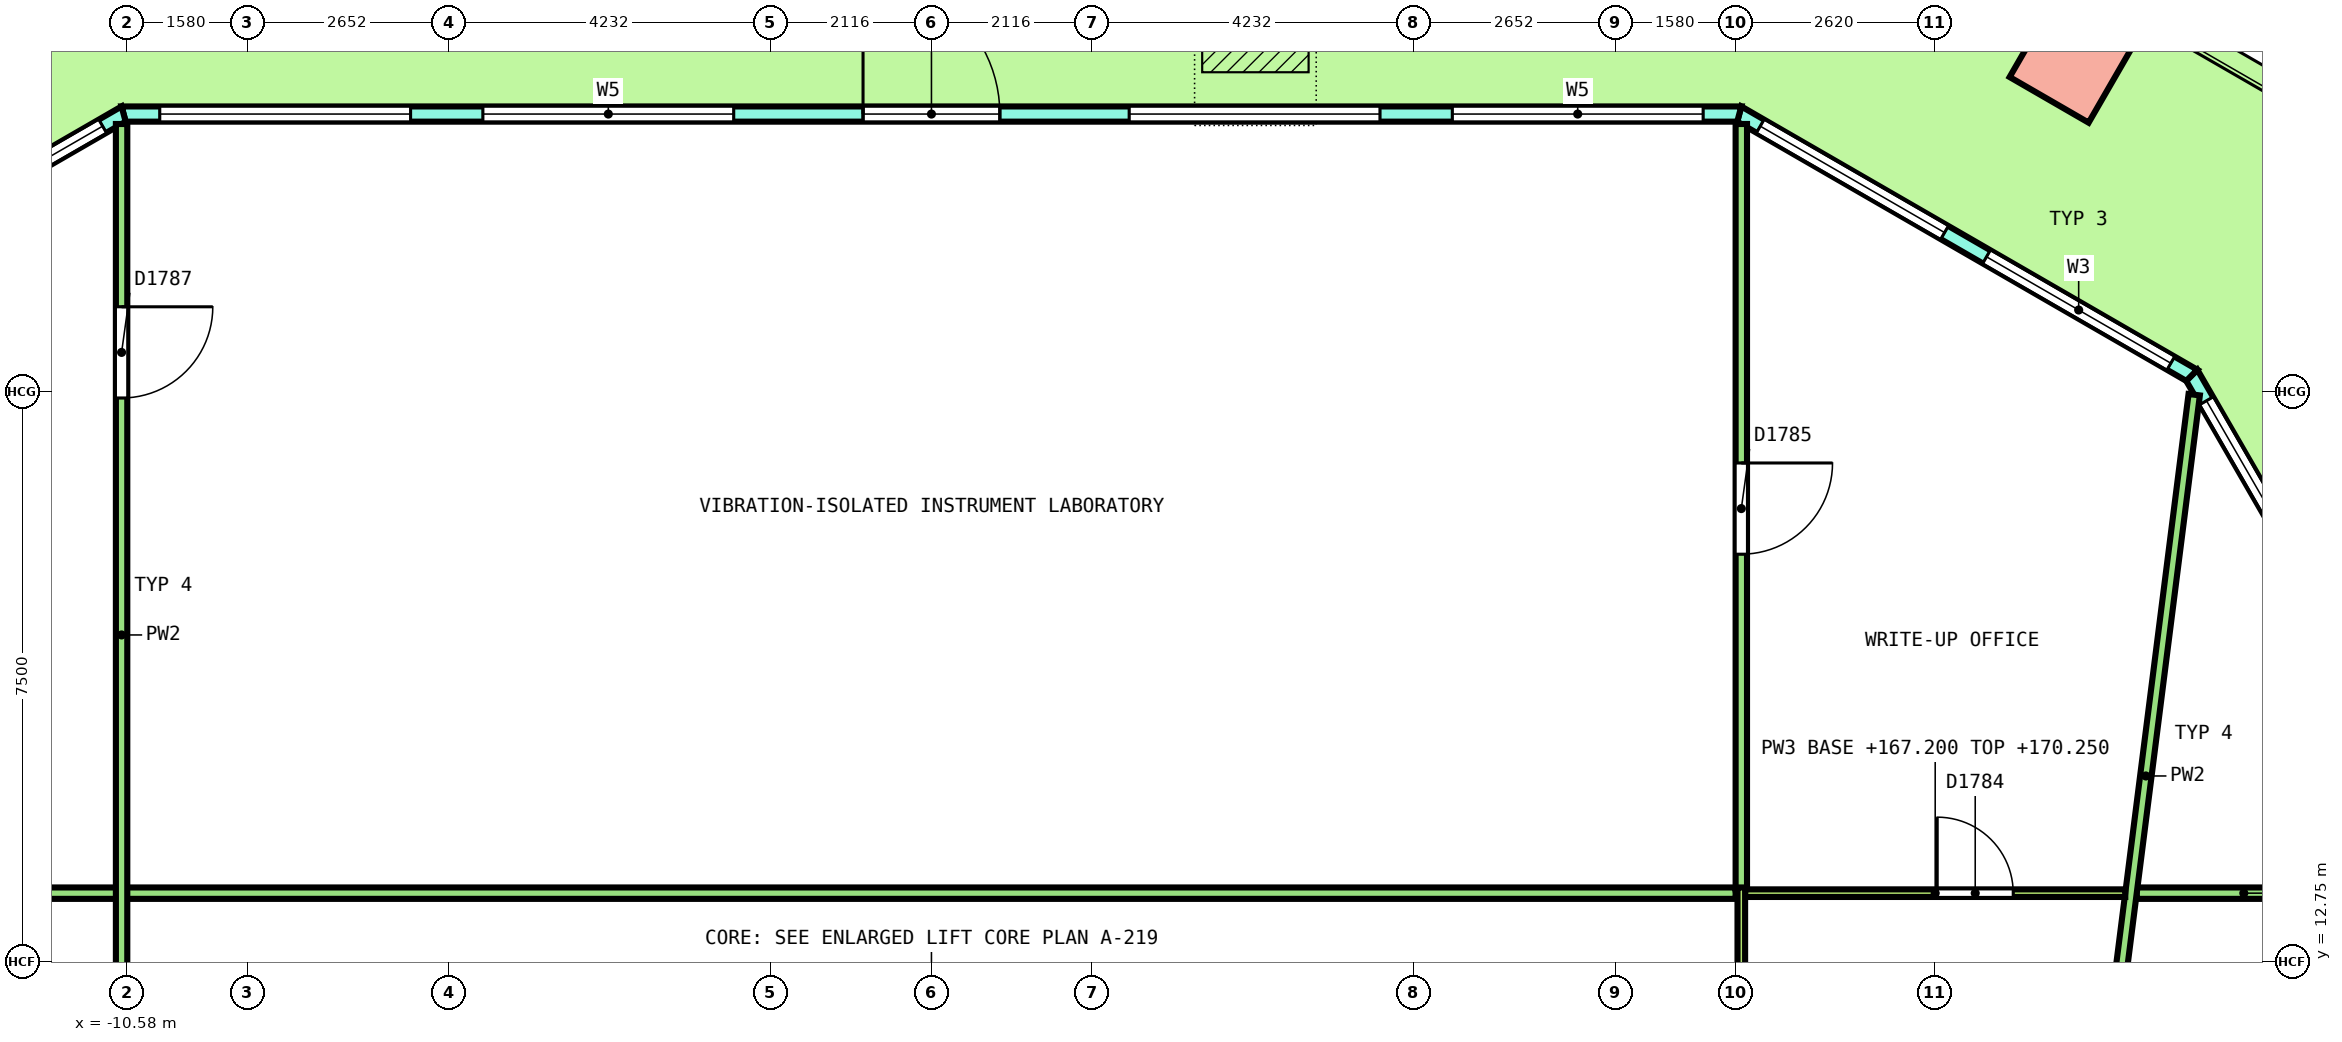
"""IFC4 building model, lengths in metres.
Left out: names, types, materials, properties, quantities, classifications, styles, units other than length and angle.
Written with IfcOpenShell. Run it as: python <this file> out.ifc"""

import sys

from ifc_helpers import new_model, si_unit, direction, frame, frame_2d, origin, origin_2d, place, context, subcontext, project, spatial, polyline, rectangle, outline, extrude, element, fill, save


model = new_model("IFC4")
c1 = context("Model", 3, precision=1e-05, world=origin(), true_north=direction((0.0, 1.0)))
c2 = subcontext(c1, "Body", "Model", "MODEL_VIEW")
j1 = project(units=[si_unit("LENGTHUNIT", "METRE"), si_unit("PLANEANGLEUNIT", "RADIAN")], contexts=[c1])
p1 = place(None, origin())
s1 = spatial("IfcSite", under=j1, at=p1, CompositionType="ELEMENT")
p2 = place(p1, origin())
s2 = spatial("IfcBuilding", under=s1, at=p2, CompositionType="ELEMENT")
p3 = place(p2, frame((0.0, 0.0, 167.2)))
s3 = spatial("IfcBuildingStorey", under=s2, at=p3, CompositionType="ELEMENT", Elevation=167.2)
p4 = place(p3, frame((15.005, 24.606, 0.0), z_axis=(0.036265236264, 0.0, 0.999342199969), x_axis=(-0.865313546461, 0.500246354177, 0.031401456084)))
e1 = element("IfcColumn", 1, at=p4, inside=s3, PredefinedType="COLUMN", context=c2, shape_type="SweptSolid", body=[
    extrude(rectangle(XDim=1.2, YDim=1.2, at=origin_2d()), origin(), (0.0, 0.0, 1.0), 4.053),
])
p5 = place(p3, frame((26.012, 4.129, 0.0), z_axis=(0.0, 0.0, 1.0), x_axis=(-0.499999588275, 0.866025641494, 0.0)))
e2 = element("IfcWall", 2, at=p5, inside=s3, PredefinedType="SOLIDWALL", context=c2, shape_type="SweptSolid", body=[
    extrude(outline(polyline([(-0.027, -0.1), (1.024, -0.1), (2.075, -0.1), (3.125, -0.1), (4.176, -0.1), (5.227, -0.1), (6.278, -0.1), (7.329, -0.1), (8.38, -0.1), (9.43, -0.1), (10.481, -0.1), (11.532, -0.1), (12.583, -0.1), (13.634, -0.1), (14.685, -0.1), (15.735, -0.1), (16.786, -0.1), (17.837, -0.1), (18.888, -0.1), (18.834, 0.1), (17.789, 0.1), (16.744, 0.1), (15.699, 0.1), (14.655, 0.1), (13.61, 0.1), (12.565, 0.1), (11.52, 0.1), (10.475, 0.1), (9.43, 0.1), (8.385, 0.1), (7.341, 0.1), (6.296, 0.1), (5.251, 0.1), (4.206, 0.1), (3.161, 0.1), (2.116, 0.1), (1.072, 0.1), (0.027, 0.1), (-0.027, -0.1)])), origin(), (0.0, 0.0, 1.0), 4.1),
])
p6 = place(p5, frame((0.386, 0.0, 0.1)))
e3 = element("IfcOpeningElement", 3, at=p6, cuts=e2, PredefinedType="OPENING", context=c2, shape_type="SweptSolid", body=[
    extrude(rectangle(XDim=3.0, YDim=2.9, at=frame_2d((1.5, 1.45))), frame((0.0, 0.11, 0.0), z_axis=(0.0, -1.0, 0.0), x_axis=(1.0, 0.0, 0.0)), (0.0, 0.0, 1.0), 0.22),
])
p7 = place(p5, frame((4.158, 0.0, 0.1)))
e4 = element("IfcOpeningElement", 4, at=p7, cuts=e2, PredefinedType="OPENING", context=c2, shape_type="SweptSolid", body=[
    extrude(rectangle(XDim=3.0, YDim=2.9, at=frame_2d((1.5, 1.45))), frame((0.0, 0.11, 0.0), z_axis=(0.0, -1.0, 0.0), x_axis=(1.0, 0.0, 0.0)), (0.0, 0.0, 1.0), 0.22),
])
p8 = place(p5, frame((8.531, 0.0, 0.0)))
e5 = element("IfcOpeningElement", 5, at=p8, cuts=e2, PredefinedType="OPENING", context=c2, shape_type="SweptSolid", body=[
    extrude(rectangle(XDim=1.8, YDim=2.4, at=frame_2d((0.9, 1.2))), frame((0.0, 0.11, 0.0), z_axis=(0.0, -1.0, 0.0), x_axis=(1.0, 0.0, 0.0)), (0.0, 0.0, 1.0), 0.22),
])
p9 = place(p5, frame((8.531, 0.0, 2.55)))
e6 = element("IfcOpeningElement", 6, at=p9, cuts=e2, PredefinedType="OPENING", context=c2, shape_type="SweptSolid", body=[
    extrude(rectangle(XDim=1.8, YDim=0.45, at=frame_2d((0.9, 0.225))), frame((0.0, 0.11, 0.0), z_axis=(0.0, -1.0, 0.0), x_axis=(1.0, 0.0, 0.0)), (0.0, 0.0, 1.0), 0.22),
])
p10 = place(p5, frame((11.703, 0.0, 0.1)))
e7 = element("IfcOpeningElement", 7, at=p10, cuts=e2, PredefinedType="OPENING", context=c2, shape_type="SweptSolid", body=[
    extrude(rectangle(XDim=3.0, YDim=2.9, at=frame_2d((1.5, 1.45))), frame((0.0, 0.11, 0.0), z_axis=(0.0, -1.0, 0.0), x_axis=(1.0, 0.0, 0.0)), (0.0, 0.0, 1.0), 0.22),
])
p11 = place(p5, frame((15.475, 0.0, 0.1)))
e8 = element("IfcOpeningElement", 8, at=p11, cuts=e2, PredefinedType="OPENING", context=c2, shape_type="SweptSolid", body=[
    extrude(rectangle(XDim=3.0, YDim=2.9, at=frame_2d((1.5, 1.45))), frame((0.0, 0.11, 0.0), z_axis=(0.0, -1.0, 0.0), x_axis=(1.0, 0.0, 0.0)), (0.0, 0.0, 1.0), 0.22),
])
p12 = place(p3, frame((16.582, 20.463, 0.0), z_axis=(0.0, 0.0, 1.0), x_axis=(-0.866029458321, 0.49999297727, 0.0)))
e9 = element("IfcWall", 9, at=p12, inside=s3, PredefinedType="SOLIDWALL", context=c2, shape_type="SweptSolid", body=[
    extrude(outline(polyline([(-0.027, -0.1), (1.128, -0.1), (2.282, -0.1), (3.437, -0.1), (4.592, -0.1), (5.747, -0.1), (6.901, -0.1), (6.848, 0.1), (5.711, 0.1), (4.574, 0.1), (3.437, 0.1), (2.301, 0.1), (1.164, 0.1), (0.027, 0.1), (-0.027, -0.1)])), origin(), (0.0, 0.0, 1.0), 4.1),
])
p13 = place(p12, frame((0.319, 0.0, 0.1)))
e10 = element("IfcOpeningElement", 10, at=p13, cuts=e9, PredefinedType="OPENING", context=c2, shape_type="SweptSolid", body=[
    extrude(rectangle(XDim=2.8, YDim=2.9, at=frame_2d((1.4, 1.45))), frame((0.0, 0.11, 0.0), z_axis=(0.0, -1.0, 0.0), x_axis=(1.0, 0.0, 0.0)), (0.0, 0.0, 1.0), 0.22),
])
p14 = place(p12, frame((3.756, 0.0, 0.1)))
e11 = element("IfcOpeningElement", 11, at=p14, cuts=e9, PredefinedType="OPENING", context=c2, shape_type="SweptSolid", body=[
    extrude(rectangle(XDim=2.8, YDim=2.9, at=frame_2d((1.4, 1.45))), frame((0.0, 0.11, 0.0), z_axis=(0.0, -1.0, 0.0), x_axis=(1.0, 0.0, 0.0)), (0.0, 0.0, 1.0), 0.22),
])
p15 = place(p3, frame((10.628, 23.9, 0.0), z_axis=(0.0, 0.0, 1.0), x_axis=(-1.0, 0.0, 0.0)))
e12 = element("IfcWall", 12, at=p15, inside=s3, PredefinedType="SOLIDWALL", context=c2, shape_type="SweptSolid", body=[
    extrude(outline(polyline([(-0.027, -0.1), (0.988, -0.1), (2.003, -0.1), (3.017, -0.1), (4.032, -0.1), (5.047, -0.1), (6.062, -0.1), (7.076, -0.1), (8.091, -0.1), (9.106, -0.1), (10.121, -0.1), (11.135, -0.1), (12.15, -0.1), (13.165, -0.1), (14.179, -0.1), (15.194, -0.1), (16.209, -0.1), (17.224, -0.1), (18.239, -0.1), (19.253, -0.1), (20.268, -0.1), (21.283, -0.1), (21.229, 0.1), (20.219, 0.1), (19.21, 0.1), (18.2, 0.1), (17.19, 0.1), (16.181, 0.1), (15.171, 0.1), (14.162, 0.1), (13.152, 0.1), (12.142, 0.1), (11.133, 0.1), (10.123, 0.1), (9.114, 0.1), (8.104, 0.1), (7.094, 0.1), (6.085, 0.1), (5.075, 0.1), (4.065, 0.1), (3.056, 0.1), (2.046, 0.1), (1.036, 0.1), (0.027, 0.1), (-0.027, -0.1)])), origin(), (0.0, 0.0, 1.0), 4.1),
])
p16 = place(p15, frame((0.476, 0.0, 0.1)))
e13 = element("IfcOpeningElement", 13, at=p16, cuts=e12, PredefinedType="OPENING", context=c2, shape_type="SweptSolid", body=[
    extrude(rectangle(XDim=3.3, YDim=2.9, at=frame_2d((1.65, 1.45))), frame((0.0, 0.11, 0.0), z_axis=(0.0, -1.0, 0.0), x_axis=(1.0, 0.0, 0.0)), (0.0, 0.0, 1.0), 0.22),
])
p17 = place(p15, frame((4.727, 0.0, 0.1)))
e14 = element("IfcOpeningElement", 14, at=p17, cuts=e12, PredefinedType="OPENING", context=c2, shape_type="SweptSolid", body=[
    extrude(rectangle(XDim=3.3, YDim=2.9, at=frame_2d((1.65, 1.45))), frame((0.0, 0.11, 0.0), z_axis=(0.0, -1.0, 0.0), x_axis=(1.0, 0.0, 0.0)), (0.0, 0.0, 1.0), 0.22),
])
p18 = place(p15, frame((9.728, 0.0, 0.0)))
e15 = element("IfcOpeningElement", 15, at=p18, cuts=e12, PredefinedType="OPENING", context=c2, shape_type="SweptSolid", body=[
    extrude(rectangle(XDim=1.8, YDim=2.4, at=frame_2d((0.9, 1.2))), frame((0.0, 0.11, 0.0), z_axis=(0.0, -1.0, 0.0), x_axis=(1.0, 0.0, 0.0)), (0.0, 0.0, 1.0), 0.22),
])
p19 = place(p15, frame((9.728, 0.0, 2.55)))
e16 = element("IfcOpeningElement", 16, at=p19, cuts=e12, PredefinedType="OPENING", context=c2, shape_type="SweptSolid", body=[
    extrude(rectangle(XDim=1.8, YDim=0.45, at=frame_2d((0.9, 0.225))), frame((0.0, 0.11, 0.0), z_axis=(0.0, -1.0, 0.0), x_axis=(1.0, 0.0, 0.0)), (0.0, 0.0, 1.0), 0.22),
])
p20 = place(p15, frame((13.229, 0.0, 0.1)))
e17 = element("IfcOpeningElement", 17, at=p20, cuts=e12, PredefinedType="OPENING", context=c2, shape_type="SweptSolid", body=[
    extrude(rectangle(XDim=3.3, YDim=2.9, at=frame_2d((1.65, 1.45))), frame((0.0, 0.11, 0.0), z_axis=(0.0, -1.0, 0.0), x_axis=(1.0, 0.0, 0.0)), (0.0, 0.0, 1.0), 0.22),
])
p21 = place(p15, frame((17.48, 0.0, 0.1)))
e18 = element("IfcOpeningElement", 18, at=p21, cuts=e12, PredefinedType="OPENING", context=c2, shape_type="SweptSolid", body=[
    extrude(rectangle(XDim=3.3, YDim=2.9, at=frame_2d((1.65, 1.45))), frame((0.0, 0.11, 0.0), z_axis=(0.0, -1.0, 0.0), x_axis=(1.0, 0.0, 0.0)), (0.0, 0.0, 1.0), 0.22),
])
p22 = place(p3, frame((-10.628, 23.9, 0.0), z_axis=(0.0, 0.0, 1.0), x_axis=(-0.866029458321, -0.49999297727, 0.0)))
e19 = element("IfcWall", 19, at=p22, inside=s3, PredefinedType="SOLIDWALL", context=c2, shape_type="SweptSolid", body=[
    extrude(outline(polyline([(-0.027, -0.1), (1.128, -0.1), (2.282, -0.1), (3.437, -0.1), (4.592, -0.1), (5.747, -0.1), (6.901, -0.1), (6.848, 0.1), (5.711, 0.1), (4.574, 0.1), (3.437, 0.1), (2.301, 0.1), (1.164, 0.1), (0.027, 0.1), (-0.027, -0.1)])), origin(), (0.0, 0.0, 1.0), 4.1),
])
p23 = place(p22, frame((0.319, 0.0, 0.1)))
e20 = element("IfcOpeningElement", 20, at=p23, cuts=e19, PredefinedType="OPENING", context=c2, shape_type="SweptSolid", body=[
    extrude(rectangle(XDim=2.8, YDim=2.9, at=frame_2d((1.4, 1.45))), frame((0.0, 0.11, 0.0), z_axis=(0.0, -1.0, 0.0), x_axis=(1.0, 0.0, 0.0)), (0.0, 0.0, 1.0), 0.22),
])
p24 = place(p22, frame((3.756, 0.0, 0.1)))
e21 = element("IfcOpeningElement", 21, at=p24, cuts=e19, PredefinedType="OPENING", context=c2, shape_type="SweptSolid", body=[
    extrude(rectangle(XDim=2.8, YDim=2.9, at=frame_2d((1.4, 1.45))), frame((0.0, 0.11, 0.0), z_axis=(0.0, -1.0, 0.0), x_axis=(1.0, 0.0, 0.0)), (0.0, 0.0, 1.0), 0.22),
])
p25 = place(p3, frame((-16.825, 13.65, 0.0), z_axis=(0.0, 0.0, 1.0), x_axis=(1.0, 0.0, 0.0)))
e22 = element("IfcWall", 22, at=p25, inside=s3, PredefinedType="PARTITIONING", context=c2, shape_type="SweptSolid", body=[
    extrude(rectangle(XDim=27.405, YDim=0.15, at=frame_2d((13.702, 0.0))), origin(), (0.0, 0.0, 1.0), 3.05),
])
p26 = place(p3, frame((15.856, 13.65, 0.0), z_axis=(0.0, 0.0, 1.0), x_axis=(1.0, 0.0, 0.0)))
e23 = element("IfcWall", 23, at=p26, inside=s3, PredefinedType="PARTITIONING", context=c2, shape_type="SweptSolid", body=[
    extrude(rectangle(XDim=2.819, YDim=0.15, at=frame_2d((1.409, 0.0))), origin(), (0.0, 0.0, 1.0), 4.1),
])
p27 = place(p3, frame((15.341, 10.176, 0.0), z_axis=(0.0, 0.0, 1.0), x_axis=(0.125826213288, 0.99205229905, 0.0)))
e24 = element("IfcWall", 24, at=p27, inside=s3, PredefinedType="PARTITIONING", context=c2, shape_type="SweptSolid", body=[
    extrude(rectangle(XDim=10.113, YDim=0.15, at=frame_2d((5.056, 0.0))), origin(), (0.0, 0.0, 1.0), 3.05),
])
p28 = place(p3, frame((10.655, 13.7, 0.0), z_axis=(0.0, 0.0, 1.0), x_axis=(0.0, 1.0, 0.0)))
e25 = element("IfcWall", 25, at=p28, inside=s3, PredefinedType="PARTITIONING", context=c2, shape_type="SweptSolid", body=[
    extrude(rectangle(XDim=10.069, YDim=0.15, at=frame_2d((5.035, 0.0))), origin(), (0.0, 0.0, 1.0), 3.05),
])
p29 = place(p28, frame((4.409, 0.0, 0.0)))
e26 = element("IfcOpeningElement", 26, at=p29, cuts=e25, PredefinedType="OPENING", context=c2, shape_type="SweptSolid", body=[
    extrude(rectangle(XDim=1.2, YDim=2.1, at=frame_2d((0.6, 1.05))), frame((0.0, 0.085, 0.0), z_axis=(0.0, -1.0, 0.0), x_axis=(1.0, 0.0, 0.0)), (0.0, 0.0, 1.0), 0.17),
])
p30 = place(p3, frame((-10.655, 10.325, 0.0), z_axis=(0.0, 0.0, 1.0), x_axis=(0.0, 1.0, 0.0)))
e27 = element("IfcWall", 27, at=p30, inside=s3, PredefinedType="PARTITIONING", context=c2, shape_type="SweptSolid", body=[
    extrude(rectangle(XDim=13.444, YDim=0.15, at=frame_2d((6.722, 0.0))), origin(), (0.0, 0.0, 1.0), 3.05),
])
p31 = place(p30, frame((9.839, 0.0, 0.0)))
e28 = element("IfcOpeningElement", 28, at=p31, cuts=e27, PredefinedType="OPENING", context=c2, shape_type="SweptSolid", body=[
    extrude(rectangle(XDim=1.2, YDim=2.1, at=frame_2d((0.6, 1.05))), frame((0.0, 0.085, 0.0), z_axis=(0.0, -1.0, 0.0), x_axis=(1.0, 0.0, 0.0)), (0.0, 0.0, 1.0), 0.17),
])
p32 = place(p3, frame((10.705, 13.65, 0.0), z_axis=(0.0, 0.0, 1.0), x_axis=(1.0, 0.0, 0.0)))
e29 = element("IfcWall", 29, at=p32, inside=s3, PredefinedType="PARTITIONING", context=c2, shape_type="SweptSolid", body=[
    extrude(rectangle(XDim=5.002, YDim=0.1, at=frame_2d((2.501, 0.0))), origin(), (0.0, 0.0, 1.0), 3.05),
])
p33 = place(p32, frame((2.527, 0.0, 0.0)))
e30 = element("IfcOpeningElement", 30, at=p33, cuts=e29, PredefinedType="OPENING", context=c2, shape_type="SweptSolid", body=[
    extrude(rectangle(XDim=1.0, YDim=2.1, at=frame_2d((0.5, 1.05))), frame((0.0, 0.06, 0.0), z_axis=(0.0, -1.0, 0.0), x_axis=(1.0, 0.0, 0.0)), (0.0, 0.0, 1.0), 0.12),
])
p34 = place(p3, frame((10.655, 10.325, 0.0), z_axis=(0.0, 0.0, 1.0), x_axis=(0.0, 1.0, 0.0)))
e31 = element("IfcWall", 31, at=p34, inside=s3, PredefinedType="PARTITIONING", context=c2, shape_type="SweptSolid", body=[
    extrude(rectangle(XDim=3.4, YDim=0.1, at=frame_2d((1.7, 0.0))), origin(), (0.0, 0.0, 1.0), 3.05),
])
p35 = place(p11, origin())
e32 = element("IfcWindow", 32, at=p35, inside=s3, PartitioningType="SINGLE_PANEL", PredefinedType="WINDOW", context=c2, shape_type="SweptSolid", body=[
    extrude(rectangle(XDim=3.0, YDim=2.9, at=frame_2d((1.5, 1.45))), frame((0.0, 0.03, 0.0), z_axis=(0.0, -1.0, 0.0), x_axis=(1.0, 0.0, 0.0)), (0.0, 0.0, 1.0), 0.06),
])
fill(e8, e32)
p36 = place(p13, origin())
e33 = element("IfcWindow", 33, at=p36, inside=s3, PartitioningType="SINGLE_PANEL", PredefinedType="WINDOW", context=c2, shape_type="SweptSolid", body=[
    extrude(rectangle(XDim=2.8, YDim=2.9, at=frame_2d((1.4, 1.45))), frame((0.0, 0.03, 0.0), z_axis=(0.0, -1.0, 0.0), x_axis=(1.0, 0.0, 0.0)), (0.0, 0.0, 1.0), 0.06),
])
fill(e10, e33)
p37 = place(p14, origin())
e34 = element("IfcWindow", 34, at=p37, inside=s3, PartitioningType="SINGLE_PANEL", PredefinedType="WINDOW", context=c2, shape_type="SweptSolid", body=[
    extrude(rectangle(XDim=2.8, YDim=2.9, at=frame_2d((1.4, 1.45))), frame((0.0, 0.03, 0.0), z_axis=(0.0, -1.0, 0.0), x_axis=(1.0, 0.0, 0.0)), (0.0, 0.0, 1.0), 0.06),
])
fill(e11, e34)
p38 = place(p16, origin())
e35 = element("IfcWindow", 35, at=p38, inside=s3, PartitioningType="SINGLE_PANEL", PredefinedType="WINDOW", context=c2, shape_type="SweptSolid", body=[
    extrude(rectangle(XDim=3.3, YDim=2.9, at=frame_2d((1.65, 1.45))), frame((0.0, 0.03, 0.0), z_axis=(0.0, -1.0, 0.0), x_axis=(1.0, 0.0, 0.0)), (0.0, 0.0, 1.0), 0.06),
])
fill(e13, e35)
p39 = place(p17, origin())
e36 = element("IfcWindow", 36, at=p39, inside=s3, PartitioningType="SINGLE_PANEL", PredefinedType="WINDOW", context=c2, shape_type="SweptSolid", body=[
    extrude(rectangle(XDim=3.3, YDim=2.9, at=frame_2d((1.65, 1.45))), frame((0.0, 0.03, 0.0), z_axis=(0.0, -1.0, 0.0), x_axis=(1.0, 0.0, 0.0)), (0.0, 0.0, 1.0), 0.06),
])
fill(e14, e36)
p40 = place(p18, origin())
e37 = element("IfcDoor", 37, at=p40, inside=s3, OperationType="DOUBLE_DOOR_SINGLE_SWING", PredefinedType="DOOR", context=c2, shape_type="SweptSolid", body=[
    extrude(rectangle(XDim=1.8, YDim=2.4, at=frame_2d((0.9, 1.2))), frame((0.0, 0.025, 0.0), z_axis=(0.0, -1.0, 0.0), x_axis=(1.0, 0.0, 0.0)), (0.0, 0.0, 1.0), 0.05),
])
fill(e15, e37)
p41 = place(p19, origin())
e38 = element("IfcWindow", 38, at=p41, inside=s3, PartitioningType="SINGLE_PANEL", PredefinedType="WINDOW", context=c2, shape_type="SweptSolid", body=[
    extrude(rectangle(XDim=1.8, YDim=0.45, at=frame_2d((0.9, 0.225))), frame((0.0, 0.03, 0.0), z_axis=(0.0, -1.0, 0.0), x_axis=(1.0, 0.0, 0.0)), (0.0, 0.0, 1.0), 0.06),
])
fill(e16, e38)
p42 = place(p20, origin())
e39 = element("IfcWindow", 39, at=p42, inside=s3, PartitioningType="SINGLE_PANEL", PredefinedType="WINDOW", context=c2, shape_type="SweptSolid", body=[
    extrude(rectangle(XDim=3.3, YDim=2.9, at=frame_2d((1.65, 1.45))), frame((0.0, 0.03, 0.0), z_axis=(0.0, -1.0, 0.0), x_axis=(1.0, 0.0, 0.0)), (0.0, 0.0, 1.0), 0.06),
])
fill(e17, e39)
p43 = place(p21, origin())
e40 = element("IfcWindow", 40, at=p43, inside=s3, PartitioningType="SINGLE_PANEL", PredefinedType="WINDOW", context=c2, shape_type="SweptSolid", body=[
    extrude(rectangle(XDim=3.3, YDim=2.9, at=frame_2d((1.65, 1.45))), frame((0.0, 0.03, 0.0), z_axis=(0.0, -1.0, 0.0), x_axis=(1.0, 0.0, 0.0)), (0.0, 0.0, 1.0), 0.06),
])
fill(e18, e40)
p44 = place(p23, origin())
e41 = element("IfcWindow", 41, at=p44, inside=s3, PartitioningType="SINGLE_PANEL", PredefinedType="WINDOW", context=c2, shape_type="SweptSolid", body=[
    extrude(rectangle(XDim=2.8, YDim=2.9, at=frame_2d((1.4, 1.45))), frame((0.0, 0.03, 0.0), z_axis=(0.0, -1.0, 0.0), x_axis=(1.0, 0.0, 0.0)), (0.0, 0.0, 1.0), 0.06),
])
fill(e20, e41)
p45 = place(p33, origin())
e42 = element("IfcDoor", 42, at=p45, inside=s3, OperationType="SINGLE_SWING_LEFT", PredefinedType="DOOR", context=c2, shape_type="SweptSolid", body=[
    extrude(rectangle(XDim=1.0, YDim=2.1, at=frame_2d((0.5, 1.05))), frame((0.0, 0.025, 0.0), z_axis=(0.0, -1.0, 0.0), x_axis=(1.0, 0.0, 0.0)), (0.0, 0.0, 1.0), 0.05),
])
fill(e30, e42)
p46 = place(p29, origin())
e43 = element("IfcDoor", 43, at=p46, inside=s3, OperationType="DOUBLE_DOOR_SINGLE_SWING", PredefinedType="DOOR", context=c2, shape_type="SweptSolid", body=[
    extrude(rectangle(XDim=1.2, YDim=2.1, at=frame_2d((0.6, 1.05))), frame((0.0, 0.025, 0.0), z_axis=(0.0, -1.0, 0.0), x_axis=(1.0, 0.0, 0.0)), (0.0, 0.0, 1.0), 0.05),
])
fill(e26, e43)
p47 = place(p31, origin())
e44 = element("IfcDoor", 44, at=p47, inside=s3, OperationType="DOUBLE_DOOR_SINGLE_SWING", PredefinedType="DOOR", context=c2, shape_type="SweptSolid", body=[
    extrude(rectangle(XDim=1.2, YDim=2.1, at=frame_2d((0.6, 1.05))), frame((0.0, 0.025, 0.0), z_axis=(0.0, -1.0, 0.0), x_axis=(1.0, 0.0, 0.0)), (0.0, 0.0, 1.0), 0.05),
])
fill(e28, e44)
save(model, sys.argv[1])
